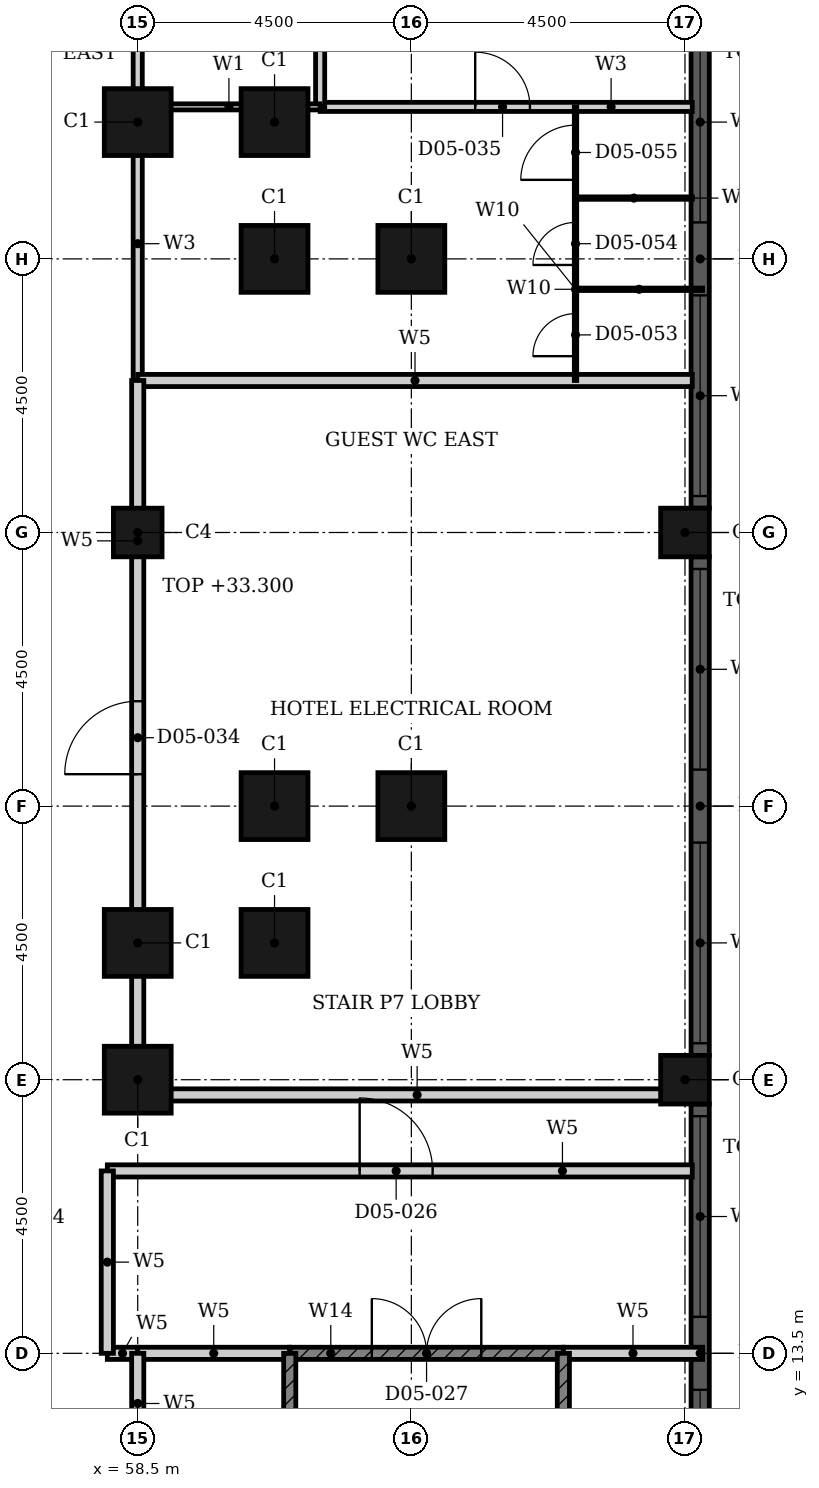
"""IFC4 building model, lengths in metres.
Left out: names, types, materials, properties, quantities, classifications, styles, units other than length and angle.
Written with IfcOpenShell. Run it as: python <this file> out.ifc"""

import sys

from ifc_helpers import new_model, si_unit, direction, frame, frame_2d, origin, origin_2d, place, context, subcontext, project, spatial, rectangle, hollow_rectangle, extrude, element, fill, save


model = new_model("IFC4")
c1 = context("Model", 3, precision=1e-05, world=origin(), true_north=direction((0.0, 1.0)))
c2 = subcontext(c1, "Body", "Model", "MODEL_VIEW")
j1 = project(units=[si_unit("LENGTHUNIT", "METRE"), si_unit("PLANEANGLEUNIT", "RADIAN")], contexts=[c1])
p1 = place(None, origin())
s1 = spatial("IfcSite", under=j1, at=p1, CompositionType="ELEMENT")
p2 = place(p1, origin())
s2 = spatial("IfcBuilding", under=s1, at=p2, CompositionType="ELEMENT")
p3 = place(p2, frame((0.0, 0.0, 28.8)))
s3 = spatial("IfcBuildingStorey", under=s2, at=p3, CompositionType="ELEMENT", Elevation=28.8)
for number, where, z_axis, x_axis in (
    (1, (58.5, 18.0, 0.0), (0.0, 0.0, 1.0), (1.0, 0.0, 0.0)),
    (2, (58.5, 20.25, 0.0), (0.0, 0.0, 1.0), (1.0, 0.0, 0.0)),
    (3, (60.75, 20.25, 0.0), (0.0, 0.0, 1.0), (1.0, 0.0, 0.0)),
    (4, (60.75, 22.5, 0.0), (0.0, 0.0, 1.0), (1.0, 0.0, 0.0)),
    (5, (63.0, 22.5, 0.0), (0.0, 0.0, 1.0), (1.0, 0.0, 0.0)),
    (6, (63.0, 31.5, 0.0), (0.0, 0.0, 1.0), (1.0, 0.0, 0.0)),
    (7, (60.75, 31.5, 0.0), (0.0, 0.0, 1.0), (1.0, 0.0, 0.0)),
    (8, (60.75, 33.75, 0.0), (0.0, 0.0, 1.0), (1.0, 0.0, 0.0)),
    (9, (58.5, 33.75, 0.0), (0.0, 0.0, 1.0), (1.0, 0.0, 0.0)),
):
    element("IfcColumn", number, at=place(p3, frame(where, z_axis=z_axis, x_axis=x_axis)), inside=s3, PredefinedType="COLUMN", context=c2, shape_type="SweptSolid", body=[
        extrude(hollow_rectangle(XDim=1.1, YDim=1.1, WallThickness=0.036, at=origin_2d()), origin(), (0.0, 0.0, 1.0), 4.8),
    ])
for number, where, z_axis, x_axis in (
    (10, (67.5, 18.0, 0.0), (0.0, 0.0, 1.0), (1.0, 0.0, 0.0)),
    (11, (67.5, 27.0, 0.0), (0.0, 0.0, 1.0), (1.0, 0.0, 0.0)),
    (12, (58.5, 27.0, 0.0), (0.0, 0.0, 1.0), (1.0, 0.0, 0.0)),
):
    element("IfcColumn", number, at=place(p3, frame(where, z_axis=z_axis, x_axis=x_axis)), inside=s3, PredefinedType="COLUMN", context=c2, shape_type="SweptSolid", body=[
        extrude(hollow_rectangle(XDim=0.8, YDim=0.8, WallThickness=0.025, at=origin_2d()), origin(), (0.0, 0.0, 1.0), 4.5),
    ])
p4 = place(p3, frame((67.75, 9.4, 0.0), z_axis=(0.0, 0.0, 1.0), x_axis=(0.0, 1.0, 0.0)))
e13 = element("IfcWall", 13, at=p4, inside=s3, PredefinedType="SOLIDWALL", context=c2, shape_type="SweptSolid", body=[
    extrude(rectangle(XDim=8.2, YDim=0.3, at=frame_2d((4.1, 0.0))), origin(), (0.0, 0.0, 1.0), 4.8),
])
p5 = place(p4, frame((0.2, 0.0, 0.9)))
e14 = element("IfcOpeningElement", 14, at=p5, cuts=e13, PredefinedType="OPENING", context=c2, shape_type="SweptSolid", body=[
    extrude(rectangle(XDim=3.3, YDim=2.9, at=frame_2d((1.65, 1.45))), frame((0.0, 0.16, 0.0), z_axis=(0.0, -1.0, 0.0), x_axis=(1.0, 0.0, 0.0)), (0.0, 0.0, 1.0), 0.32),
])
p6 = place(p4, frame((4.7, 0.0, 0.9)))
e15 = element("IfcOpeningElement", 15, at=p6, cuts=e13, PredefinedType="OPENING", context=c2, shape_type="SweptSolid", body=[
    extrude(rectangle(XDim=3.3, YDim=2.9, at=frame_2d((1.65, 1.45))), frame((0.0, 0.16, 0.0), z_axis=(0.0, -1.0, 0.0), x_axis=(1.0, 0.0, 0.0)), (0.0, 0.0, 1.0), 0.32),
])
p7 = place(p3, frame((67.75, 18.4, 0.0), z_axis=(0.0, 0.0, 1.0), x_axis=(0.0, 1.0, 0.0)))
e16 = element("IfcWall", 16, at=p7, inside=s3, PredefinedType="SOLIDWALL", context=c2, shape_type="SweptSolid", body=[
    extrude(rectangle(XDim=8.2, YDim=0.3, at=frame_2d((4.1, 0.0))), origin(), (0.0, 0.0, 1.0), 4.8),
])
p8 = place(p7, frame((0.2, 0.0, 0.9)))
e17 = element("IfcOpeningElement", 17, at=p8, cuts=e16, PredefinedType="OPENING", context=c2, shape_type="SweptSolid", body=[
    extrude(rectangle(XDim=3.3, YDim=2.9, at=frame_2d((1.65, 1.45))), frame((0.0, 0.16, 0.0), z_axis=(0.0, -1.0, 0.0), x_axis=(1.0, 0.0, 0.0)), (0.0, 0.0, 1.0), 0.32),
])
p9 = place(p7, frame((4.7, 0.0, 0.9)))
e18 = element("IfcOpeningElement", 18, at=p9, cuts=e16, PredefinedType="OPENING", context=c2, shape_type="SweptSolid", body=[
    extrude(rectangle(XDim=3.3, YDim=2.9, at=frame_2d((1.65, 1.45))), frame((0.0, 0.16, 0.0), z_axis=(0.0, -1.0, 0.0), x_axis=(1.0, 0.0, 0.0)), (0.0, 0.0, 1.0), 0.32),
])
p10 = place(p3, frame((67.75, 27.4, 0.0), z_axis=(0.0, 0.0, 1.0), x_axis=(0.0, 1.0, 0.0)))
e19 = element("IfcWall", 19, at=p10, inside=s3, PredefinedType="SOLIDWALL", context=c2, shape_type="SweptSolid", body=[
    extrude(rectangle(XDim=8.2, YDim=0.3, at=frame_2d((4.1, 0.0))), origin(), (0.0, 0.0, 1.0), 4.8),
])
p11 = place(p10, frame((0.2, 0.0, 0.9)))
e20 = element("IfcOpeningElement", 20, at=p11, cuts=e19, PredefinedType="OPENING", context=c2, shape_type="SweptSolid", body=[
    extrude(rectangle(XDim=3.3, YDim=2.9, at=frame_2d((1.65, 1.45))), frame((0.0, 0.16, 0.0), z_axis=(0.0, -1.0, 0.0), x_axis=(1.0, 0.0, 0.0)), (0.0, 0.0, 1.0), 0.32),
])
p12 = place(p10, frame((4.7, 0.0, 0.9)))
e21 = element("IfcOpeningElement", 21, at=p12, cuts=e19, PredefinedType="OPENING", context=c2, shape_type="SweptSolid", body=[
    extrude(rectangle(XDim=3.3, YDim=2.9, at=frame_2d((1.65, 1.45))), frame((0.0, 0.16, 0.0), z_axis=(0.0, -1.0, 0.0), x_axis=(1.0, 0.0, 0.0)), (0.0, 0.0, 1.0), 0.32),
])
p13 = place(p3, frame((61.5, 34.0, 0.0), z_axis=(0.0, 0.0, 1.0), x_axis=(1.0, 0.0, 0.0)))
e22 = element("IfcWall", 22, at=p13, inside=s3, PredefinedType="PARTITIONING", context=c2, shape_type="SweptSolid", body=[
    extrude(rectangle(XDim=6.12, YDim=0.15, at=frame_2d((3.06, 0.0))), origin(), (0.0, 0.0, 1.0), 4.5),
])
p14 = place(p13, frame((2.55, 0.0, 0.0)))
e23 = element("IfcOpeningElement", 23, at=p14, cuts=e22, PredefinedType="OPENING", context=c2, shape_type="SweptSolid", body=[
    extrude(rectangle(XDim=0.9, YDim=2.1, at=frame_2d((0.45, 1.05))), frame((0.0, 0.085, 0.0), z_axis=(0.0, -1.0, 0.0), x_axis=(1.0, 0.0, 0.0)), (0.0, 0.0, 1.0), 0.17),
])
p15 = place(p3, frame((58.5, 29.5, 0.0), z_axis=(0.0, 0.0, 1.0), x_axis=(0.0, 1.0, 0.0)))
e24 = element("IfcWall", 24, at=p15, inside=s3, PredefinedType="PARTITIONING", context=c2, shape_type="SweptSolid", body=[
    extrude(rectangle(XDim=4.5, YDim=0.15, at=frame_2d((2.25, 0.0))), origin(), (0.0, 0.0, 1.0), 4.5),
])
p16 = place(p3, frame((58.5, 34.0, 0.0), z_axis=(0.0, 0.0, 1.0), x_axis=(0.0, 1.0, 0.0)))
e25 = element("IfcWall", 25, at=p16, inside=s3, PredefinedType="PARTITIONING", context=c2, shape_type="SweptSolid", body=[
    extrude(rectangle(XDim=2.4, YDim=0.15, at=frame_2d((1.2, 0.0))), origin(), (0.0, 0.0, 1.0), 3.88),
])
p17 = place(p3, frame((61.5, 34.0, 0.0), z_axis=(0.0, 0.0, 1.0), x_axis=(0.0, 1.0, 0.0)))
e26 = element("IfcWall", 26, at=p17, inside=s3, PredefinedType="PARTITIONING", context=c2, shape_type="SweptSolid", body=[
    extrude(rectangle(XDim=2.4, YDim=0.15, at=frame_2d((1.2, 0.0))), origin(), (0.0, 0.0, 1.0), 4.5),
])
p18 = place(p3, frame((58.5, 34.0, 0.0), z_axis=(0.0, 0.0, 1.0), x_axis=(1.0, 0.0, 0.0)))
e27 = element("IfcWall", 27, at=p18, inside=s3, PredefinedType="PARTITIONING", context=c2, shape_type="SweptSolid", body=[
    extrude(rectangle(XDim=3.0, YDim=0.1, at=frame_2d((1.5, 0.0))), origin(), (0.0, 0.0, 1.0), 4.5),
])
p19 = place(p3, frame((58.0, 13.5, 0.0), z_axis=(0.0, 0.0, 1.0), x_axis=(1.0, 0.0, 0.0)))
e28 = element("IfcWall", 28, at=p19, inside=s3, PredefinedType="PARTITIONING", context=c2, shape_type="SweptSolid", body=[
    extrude(rectangle(XDim=0.5, YDim=0.2, at=frame_2d((0.25, 0.0))), origin(), (0.0, 0.0, 1.0), 4.5),
])
p20 = place(p3, frame((58.5, 13.5, 0.0), z_axis=(0.0, 0.0, 1.0), x_axis=(1.0, 0.0, 0.0)))
e29 = element("IfcWall", 29, at=p20, inside=s3, PredefinedType="PARTITIONING", context=c2, shape_type="SweptSolid", body=[
    extrude(rectangle(XDim=2.5, YDim=0.2, at=frame_2d((1.25, 0.0))), origin(), (0.0, 0.0, 1.0), 4.5),
])
p21 = place(p3, frame((65.5, 13.5, 0.0), z_axis=(0.0, 0.0, 1.0), x_axis=(1.0, 0.0, 0.0)))
e30 = element("IfcWall", 30, at=p21, inside=s3, PredefinedType="PARTITIONING", context=c2, shape_type="SweptSolid", body=[
    extrude(rectangle(XDim=2.29, YDim=0.2, at=frame_2d((1.145, 0.0))), origin(), (0.0, 0.0, 1.0), 4.5),
])
p22 = place(p3, frame((58.0, 16.5, 0.0), z_axis=(0.0, 0.0, 1.0), x_axis=(1.0, 0.0, 0.0)))
e31 = element("IfcWall", 31, at=p22, inside=s3, PredefinedType="PARTITIONING", context=c2, shape_type="SweptSolid", body=[
    extrude(rectangle(XDim=9.62, YDim=0.2, at=frame_2d((4.81, 0.0))), origin(), (0.0, 0.0, 1.0), 4.5),
])
p23 = place(p22, frame((4.15, 0.0, 0.0)))
e32 = element("IfcOpeningElement", 32, at=p23, cuts=e31, PredefinedType="OPENING", context=c2, shape_type="SweptSolid", body=[
    extrude(rectangle(XDim=1.2, YDim=2.1, at=frame_2d((0.6, 1.05))), frame((0.0, 0.11, 0.0), z_axis=(0.0, -1.0, 0.0), x_axis=(1.0, 0.0, 0.0)), (0.0, 0.0, 1.0), 0.22),
])
p24 = place(p3, frame((58.5, 17.75, 0.0), z_axis=(0.0, 0.0, 1.0), x_axis=(1.0, 0.0, 0.0)))
e33 = element("IfcWall", 33, at=p24, inside=s3, PredefinedType="PARTITIONING", context=c2, shape_type="SweptSolid", body=[
    extrude(rectangle(XDim=9.19, YDim=0.2, at=frame_2d((4.595, 0.0))), origin(), (0.0, 0.0, 1.0), 4.5),
])
p25 = place(p3, frame((58.5, 29.5, 0.0), z_axis=(0.0, 0.0, 1.0), x_axis=(1.0, 0.0, 0.0)))
e34 = element("IfcWall", 34, at=p25, inside=s3, PredefinedType="PARTITIONING", context=c2, shape_type="SweptSolid", body=[
    extrude(rectangle(XDim=9.12, YDim=0.2, at=frame_2d((4.56, 0.0))), origin(), (0.0, 0.0, 1.0), 4.5),
])
p26 = place(p3, frame((58.0, 13.5, 0.0), z_axis=(0.0, 0.0, 1.0), x_axis=(0.0, 1.0, 0.0)))
e35 = element("IfcWall", 35, at=p26, inside=s3, PredefinedType="PARTITIONING", context=c2, shape_type="SweptSolid", body=[
    extrude(rectangle(XDim=3.0, YDim=0.2, at=frame_2d((1.5, 0.0))), origin(), (0.0, 0.0, 1.0), 4.5),
])
p27 = place(p3, frame((58.5, 9.0, 0.0), z_axis=(0.0, 0.0, 1.0), x_axis=(0.0, 1.0, 0.0)))
e36 = element("IfcWall", 36, at=p27, inside=s3, PredefinedType="PARTITIONING", context=c2, shape_type="SweptSolid", body=[
    extrude(rectangle(XDim=4.5, YDim=0.2, at=frame_2d((2.25, 0.0))), origin(), (0.0, 0.0, 1.0), 4.5),
])
p28 = place(p27, frame((1.65, 0.0, 0.0)))
e37 = element("IfcOpeningElement", 37, at=p28, cuts=e36, PredefinedType="OPENING", context=c2, shape_type="SweptSolid", body=[
    extrude(rectangle(XDim=1.2, YDim=2.1, at=frame_2d((0.6, 1.05))), frame((0.0, 0.11, 0.0), z_axis=(0.0, -1.0, 0.0), x_axis=(1.0, 0.0, 0.0)), (0.0, 0.0, 1.0), 0.22),
])
p29 = place(p3, frame((58.5, 17.75, 0.0), z_axis=(0.0, 0.0, 1.0), x_axis=(0.0, 1.0, 0.0)))
e38 = element("IfcWall", 38, at=p29, inside=s3, PredefinedType="PARTITIONING", context=c2, shape_type="SweptSolid", body=[
    extrude(rectangle(XDim=11.75, YDim=0.2, at=frame_2d((5.875, 0.0))), origin(), (0.0, 0.0, 1.0), 3.88),
])
p30 = place(p29, frame((5.275, 0.0, 0.0)))
e39 = element("IfcOpeningElement", 39, at=p30, cuts=e38, PredefinedType="OPENING", context=c2, shape_type="SweptSolid", body=[
    extrude(rectangle(XDim=1.2, YDim=2.1, at=frame_2d((0.6, 1.05))), frame((0.0, 0.11, 0.0), z_axis=(0.0, -1.0, 0.0), x_axis=(1.0, 0.0, 0.0)), (0.0, 0.0, 1.0), 0.22),
])
p31 = place(p3, frame((61.0, 13.5, 0.0), z_axis=(0.0, 0.0, 1.0), x_axis=(1.0, 0.0, 0.0)))
e40 = element("IfcWall", 40, at=p31, inside=s3, PredefinedType="SHEAR", context=c2, shape_type="SweptSolid", body=[
    extrude(rectangle(XDim=4.5, YDim=0.2, at=frame_2d((2.25, 0.0))), origin(), (0.0, 0.0, 1.0), 4.5),
])
p32 = place(p31, frame((1.35, 0.0, 0.0)))
e41 = element("IfcOpeningElement", 41, at=p32, cuts=e40, PredefinedType="OPENING", context=c2, shape_type="SweptSolid", body=[
    extrude(rectangle(XDim=1.8, YDim=2.1, at=frame_2d((0.9, 1.05))), frame((0.0, 0.11, 0.0), z_axis=(0.0, -1.0, 0.0), x_axis=(1.0, 0.0, 0.0)), (0.0, 0.0, 1.0), 0.22),
])
for number, where, z_axis, x_axis in (
    (42, (61.0, 5.05, 0.0), (0.0, 0.0, 1.0), (0.0, 1.0, 0.0)),
    (43, (65.5, 5.05, 0.0), (0.0, 0.0, 1.0), (0.0, 1.0, 0.0)),
):
    element("IfcWall", number, at=place(p3, frame(where, z_axis=z_axis, x_axis=x_axis)), inside=s3, PredefinedType="SHEAR", context=c2, shape_type="SweptSolid", body=[
        extrude(rectangle(XDim=8.45, YDim=0.2, at=frame_2d((4.225, 0.0))), origin(), (0.0, 0.0, 1.0), 4.5),
    ])
p33 = place(p3, frame((67.79, 31.0, 0.0), z_axis=(0.0, 0.0, 1.0), x_axis=(-1.0, 0.0, 0.0)))
e44 = element("IfcWall", 44, at=p33, inside=s3, PredefinedType="PARTITIONING", context=c2, shape_type="SweptSolid", body=[
    extrude(rectangle(XDim=2.09, YDim=0.04, at=frame_2d((1.045, 0.0))), origin(), (0.0, 0.0, 1.0), 4.5),
])
p34 = place(p3, frame((67.62, 32.5, 0.0), z_axis=(0.0, 0.0, 1.0), x_axis=(-1.0, 0.0, 0.0)))
e45 = element("IfcWall", 45, at=p34, inside=s3, PredefinedType="PARTITIONING", context=c2, shape_type="SweptSolid", body=[
    extrude(rectangle(XDim=1.92, YDim=0.04, at=frame_2d((0.96, 0.0))), origin(), (0.0, 0.0, 1.0), 4.5),
])
p35 = place(p3, frame((65.7, 29.5, 0.0), z_axis=(0.0, 0.0, 1.0), x_axis=(0.0, 1.0, 0.0)))
e46 = element("IfcWall", 46, at=p35, inside=s3, PredefinedType="PARTITIONING", context=c2, shape_type="SweptSolid", body=[
    extrude(rectangle(XDim=4.5, YDim=0.04, at=frame_2d((2.25, 0.0))), origin(), (0.0, 0.0, 1.0), 4.5),
])
p36 = place(p35, frame((0.4, 0.0, 0.0)))
e47 = element("IfcOpeningElement", 47, at=p36, cuts=e46, PredefinedType="OPENING", context=c2, shape_type="SweptSolid", body=[
    extrude(rectangle(XDim=0.7, YDim=2.0, at=frame_2d((0.35, 1.0))), frame((0.0, 0.03, 0.0), z_axis=(0.0, -1.0, 0.0), x_axis=(1.0, 0.0, 0.0)), (0.0, 0.0, 1.0), 0.06),
])
p37 = place(p35, frame((1.9, 0.0, 0.0)))
e48 = element("IfcOpeningElement", 48, at=p37, cuts=e46, PredefinedType="OPENING", context=c2, shape_type="SweptSolid", body=[
    extrude(rectangle(XDim=0.7, YDim=2.0, at=frame_2d((0.35, 1.0))), frame((0.0, 0.03, 0.0), z_axis=(0.0, -1.0, 0.0), x_axis=(1.0, 0.0, 0.0)), (0.0, 0.0, 1.0), 0.06),
])
p38 = place(p35, frame((3.3, 0.0, 0.0)))
e49 = element("IfcOpeningElement", 49, at=p38, cuts=e46, PredefinedType="OPENING", context=c2, shape_type="SweptSolid", body=[
    extrude(rectangle(XDim=0.9, YDim=2.0, at=frame_2d((0.45, 1.0))), frame((0.0, 0.03, 0.0), z_axis=(0.0, -1.0, 0.0), x_axis=(1.0, 0.0, 0.0)), (0.0, 0.0, 1.0), 0.06),
])
p39 = place(p5, origin())
e50 = element("IfcWindow", 50, at=p39, inside=s3, PartitioningType="SINGLE_PANEL", PredefinedType="WINDOW", context=c2, shape_type="SweptSolid", body=[
    extrude(rectangle(XDim=3.3, YDim=2.9, at=frame_2d((1.65, 1.45))), frame((0.0, 0.03, 0.0), z_axis=(0.0, -1.0, 0.0), x_axis=(1.0, 0.0, 0.0)), (0.0, 0.0, 1.0), 0.06),
])
fill(e14, e50)
p40 = place(p6, origin())
e51 = element("IfcWindow", 51, at=p40, inside=s3, PartitioningType="SINGLE_PANEL", PredefinedType="WINDOW", context=c2, shape_type="SweptSolid", body=[
    extrude(rectangle(XDim=3.3, YDim=2.9, at=frame_2d((1.65, 1.45))), frame((0.0, 0.03, 0.0), z_axis=(0.0, -1.0, 0.0), x_axis=(1.0, 0.0, 0.0)), (0.0, 0.0, 1.0), 0.06),
])
fill(e15, e51)
p41 = place(p8, origin())
e52 = element("IfcWindow", 52, at=p41, inside=s3, PartitioningType="SINGLE_PANEL", PredefinedType="WINDOW", context=c2, shape_type="SweptSolid", body=[
    extrude(rectangle(XDim=3.3, YDim=2.9, at=frame_2d((1.65, 1.45))), frame((0.0, 0.03, 0.0), z_axis=(0.0, -1.0, 0.0), x_axis=(1.0, 0.0, 0.0)), (0.0, 0.0, 1.0), 0.06),
])
fill(e17, e52)
p42 = place(p9, origin())
e53 = element("IfcWindow", 53, at=p42, inside=s3, PartitioningType="SINGLE_PANEL", PredefinedType="WINDOW", context=c2, shape_type="SweptSolid", body=[
    extrude(rectangle(XDim=3.3, YDim=2.9, at=frame_2d((1.65, 1.45))), frame((0.0, 0.03, 0.0), z_axis=(0.0, -1.0, 0.0), x_axis=(1.0, 0.0, 0.0)), (0.0, 0.0, 1.0), 0.06),
])
fill(e18, e53)
p43 = place(p11, origin())
e54 = element("IfcWindow", 54, at=p43, inside=s3, PartitioningType="SINGLE_PANEL", PredefinedType="WINDOW", context=c2, shape_type="SweptSolid", body=[
    extrude(rectangle(XDim=3.3, YDim=2.9, at=frame_2d((1.65, 1.45))), frame((0.0, 0.03, 0.0), z_axis=(0.0, -1.0, 0.0), x_axis=(1.0, 0.0, 0.0)), (0.0, 0.0, 1.0), 0.06),
])
fill(e20, e54)
p44 = place(p12, origin())
e55 = element("IfcWindow", 55, at=p44, inside=s3, PartitioningType="SINGLE_PANEL", PredefinedType="WINDOW", context=c2, shape_type="SweptSolid", body=[
    extrude(rectangle(XDim=3.3, YDim=2.9, at=frame_2d((1.65, 1.45))), frame((0.0, 0.03, 0.0), z_axis=(0.0, -1.0, 0.0), x_axis=(1.0, 0.0, 0.0)), (0.0, 0.0, 1.0), 0.06),
])
fill(e21, e55)
p45 = place(p23, origin())
e56 = element("IfcDoor", 56, at=p45, inside=s3, OperationType="SINGLE_SWING_LEFT", PredefinedType="DOOR", context=c2, shape_type="SweptSolid", body=[
    extrude(rectangle(XDim=1.2, YDim=2.1, at=frame_2d((0.6, 1.05))), frame((0.0, 0.025, 0.0), z_axis=(0.0, -1.0, 0.0), x_axis=(1.0, 0.0, 0.0)), (0.0, 0.0, 1.0), 0.05),
])
fill(e32, e56)
p46 = place(p32, origin())
e57 = element("IfcDoor", 57, at=p46, inside=s3, OperationType="DOUBLE_DOOR_SINGLE_SWING", PredefinedType="DOOR", context=c2, shape_type="SweptSolid", body=[
    extrude(rectangle(XDim=1.8, YDim=2.1, at=frame_2d((0.9, 1.05))), frame((0.0, 0.025, 0.0), z_axis=(0.0, -1.0, 0.0), x_axis=(1.0, 0.0, 0.0)), (0.0, 0.0, 1.0), 0.05),
])
fill(e41, e57)
p47 = place(p30, origin())
e58 = element("IfcDoor", 58, at=p47, inside=s3, OperationType="SINGLE_SWING_LEFT", PredefinedType="DOOR", context=c2, shape_type="SweptSolid", body=[
    extrude(rectangle(XDim=1.2, YDim=2.1, at=frame_2d((0.6, 1.05))), frame((0.0, 0.025, 0.0), z_axis=(0.0, -1.0, 0.0), x_axis=(1.0, 0.0, 0.0)), (0.0, 0.0, 1.0), 0.05),
])
fill(e39, e58)
p48 = place(p14, origin())
e59 = element("IfcDoor", 59, at=p48, inside=s3, OperationType="SINGLE_SWING_RIGHT", PredefinedType="DOOR", context=c2, shape_type="SweptSolid", body=[
    extrude(rectangle(XDim=0.9, YDim=2.1, at=frame_2d((0.45, 1.05))), frame((0.0, 0.025, 0.0), z_axis=(0.0, -1.0, 0.0), x_axis=(1.0, 0.0, 0.0)), (0.0, 0.0, 1.0), 0.05),
])
fill(e23, e59)
p49 = place(p36, origin())
e60 = element("IfcDoor", 60, at=p49, inside=s3, OperationType="SINGLE_SWING_LEFT", PredefinedType="DOOR", context=c2, shape_type="SweptSolid", body=[
    extrude(rectangle(XDim=0.7, YDim=2.0, at=frame_2d((0.35, 1.0))), frame((0.0, 0.02, 0.0), z_axis=(0.0, -1.0, 0.0), x_axis=(1.0, 0.0, 0.0)), (0.0, 0.0, 1.0), 0.04),
])
fill(e47, e60)
p50 = place(p37, origin())
e61 = element("IfcDoor", 61, at=p50, inside=s3, OperationType="SINGLE_SWING_LEFT", PredefinedType="DOOR", context=c2, shape_type="SweptSolid", body=[
    extrude(rectangle(XDim=0.7, YDim=2.0, at=frame_2d((0.35, 1.0))), frame((0.0, 0.02, 0.0), z_axis=(0.0, -1.0, 0.0), x_axis=(1.0, 0.0, 0.0)), (0.0, 0.0, 1.0), 0.04),
])
fill(e48, e61)
p51 = place(p38, origin())
e62 = element("IfcDoor", 62, at=p51, inside=s3, OperationType="SINGLE_SWING_RIGHT", PredefinedType="DOOR", context=c2, shape_type="SweptSolid", body=[
    extrude(rectangle(XDim=0.9, YDim=2.0, at=frame_2d((0.45, 1.0))), frame((0.0, 0.02, 0.0), z_axis=(0.0, -1.0, 0.0), x_axis=(1.0, 0.0, 0.0)), (0.0, 0.0, 1.0), 0.04),
])
fill(e49, e62)
save(model, sys.argv[1])
